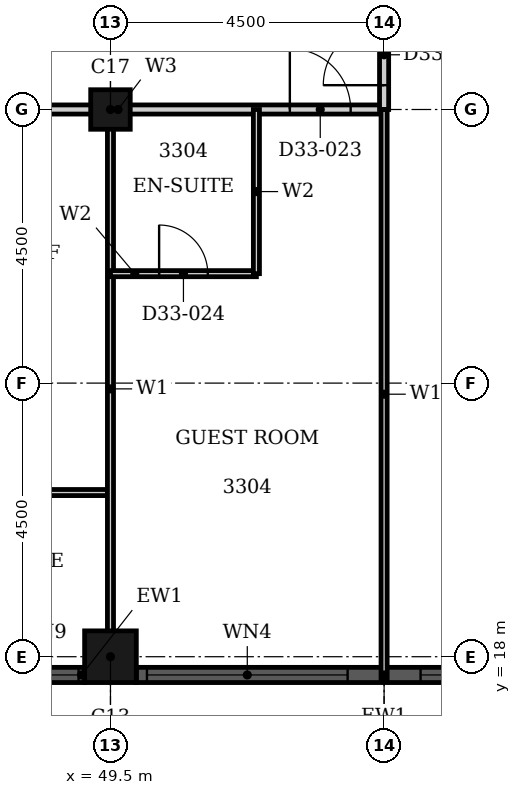
"""IFC4 building model, lengths in metres.
Left out: names, types, materials, properties, quantities, classifications, styles, units other than length and angle.
Written with IfcOpenShell. Run it as: python <this file> out.ifc"""

import sys

from ifc_helpers import new_model, si_unit, direction, frame, frame_2d, origin, origin_2d, place, context, subcontext, project, spatial, rectangle, hollow_rectangle, extrude, element, fill, save


model = new_model("IFC4")
c1 = context("Model", 3, precision=1e-05, world=origin(), true_north=direction((0.0, 1.0)))
c2 = subcontext(c1, "Body", "Model", "MODEL_VIEW")
j1 = project(units=[si_unit("LENGTHUNIT", "METRE"), si_unit("PLANEANGLEUNIT", "RADIAN")], contexts=[c1])
p1 = place(None, origin())
s1 = spatial("IfcSite", under=j1, at=p1, CompositionType="ELEMENT")
p2 = place(p1, origin())
s2 = spatial("IfcBuilding", under=s1, at=p2, CompositionType="ELEMENT")
p3 = place(p2, frame((0.0, 0.0, 133.2)))
s3 = spatial("IfcBuildingStorey", under=s2, at=p3, CompositionType="ELEMENT", Elevation=133.2)
p4 = place(p3, frame((49.5, 18.0, 0.0), z_axis=(0.0, 0.0, 1.0), x_axis=(1.0, 0.0, 0.0)))
e1 = element("IfcColumn", 1, at=p4, inside=s3, PredefinedType="COLUMN", context=c2, shape_type="SweptSolid", body=[
    extrude(hollow_rectangle(XDim=0.85, YDim=0.85, WallThickness=0.026, at=origin_2d()), origin(), (0.0, 0.0, 1.0), 3.6),
])
p5 = place(p3, frame((49.5, 27.0, 0.0), z_axis=(0.0, 0.0, 1.0), x_axis=(1.0, 0.0, 0.0)))
e2 = element("IfcColumn", 2, at=p5, inside=s3, PredefinedType="COLUMN", context=c2, shape_type="SweptSolid", body=[
    extrude(hollow_rectangle(XDim=0.65, YDim=0.65, WallThickness=0.021, at=origin_2d()), origin(), (0.0, 0.0, 1.0), 3.6),
])
p6 = place(p3, frame((47.675, 17.7, 0.0), z_axis=(0.0, 0.0, 1.0), x_axis=(1.0, 0.0, 0.0)))
e3 = element("IfcWall", 3, at=p6, inside=s3, PredefinedType="SOLIDWALL", context=c2, shape_type="SweptSolid", body=[
    extrude(rectangle(XDim=1.4, YDim=0.25, at=frame_2d((0.7, 0.0))), origin(), (0.0, 0.0, 1.0), 3.6),
])
p7 = place(p6, frame((0.1, 0.0, 0.9)))
e4 = element("IfcOpeningElement", 4, at=p7, cuts=e3, PredefinedType="OPENING", context=c2, shape_type="SweptSolid", body=[
    extrude(rectangle(XDim=1.2, YDim=2.08, at=frame_2d((0.6, 1.04))), frame((0.0, 0.135, 0.0), z_axis=(0.0, -1.0, 0.0), x_axis=(1.0, 0.0, 0.0)), (0.0, 0.0, 1.0), 0.27),
])
p8 = place(p3, frame((49.925, 17.7, 0.0), z_axis=(0.0, 0.0, 1.0), x_axis=(1.0, 0.0, 0.0)))
e5 = element("IfcWall", 5, at=p8, inside=s3, PredefinedType="SOLIDWALL", context=c2, shape_type="SweptSolid", body=[
    extrude(rectangle(XDim=8.15, YDim=0.25, at=frame_2d((4.075, 0.0))), origin(), (0.0, 0.0, 1.0), 3.6),
])
p9 = place(p8, frame((0.175, 0.0, 0.9)))
e6 = element("IfcOpeningElement", 6, at=p9, cuts=e5, PredefinedType="OPENING", context=c2, shape_type="SweptSolid", body=[
    extrude(rectangle(XDim=3.3, YDim=2.08, at=frame_2d((1.65, 1.04))), frame((0.0, 0.135, 0.0), z_axis=(0.0, -1.0, 0.0), x_axis=(1.0, 0.0, 0.0)), (0.0, 0.0, 1.0), 0.27),
])
p10 = place(p8, frame((4.675, 0.0, 0.9)))
e7 = element("IfcOpeningElement", 7, at=p10, cuts=e5, PredefinedType="OPENING", context=c2, shape_type="SweptSolid", body=[
    extrude(rectangle(XDim=3.3, YDim=2.08, at=frame_2d((1.65, 1.04))), frame((0.0, 0.135, 0.0), z_axis=(0.0, -1.0, 0.0), x_axis=(1.0, 0.0, 0.0)), (0.0, 0.0, 1.0), 0.27),
])
p11 = place(p3, frame((46.8, 27.0, 0.0), z_axis=(0.0, 0.0, 1.0), x_axis=(1.0, 0.0, 0.0)))
e8 = element("IfcWall", 8, at=p11, inside=s3, PredefinedType="PARTITIONING", context=c2, shape_type="SweptSolid", body=[
    extrude(rectangle(XDim=7.2, YDim=0.15, at=frame_2d((3.6, 0.0))), origin(), (0.0, 0.0, 1.0), 2.58),
])
p12 = place(p11, frame((5.65, 0.0, 0.0)))
e9 = element("IfcOpeningElement", 9, at=p12, cuts=e8, PredefinedType="OPENING", context=c2, shape_type="SweptSolid", body=[
    extrude(rectangle(XDim=1.0, YDim=2.1, at=frame_2d((0.5, 1.05))), frame((0.0, 0.085, 0.0), z_axis=(0.0, -1.0, 0.0), x_axis=(1.0, 0.0, 0.0)), (0.0, 0.0, 1.0), 0.17),
])
p13 = place(p3, frame((54.0, 27.0, 0.0), z_axis=(0.0, 0.0, 1.0), x_axis=(0.0, 1.0, 0.0)))
e10 = element("IfcWall", 10, at=p13, inside=s3, PredefinedType="PARTITIONING", context=c2, shape_type="SweptSolid", body=[
    extrude(rectangle(XDim=1.8, YDim=0.15, at=frame_2d((0.9, 0.0))), origin(), (0.0, 0.0, 1.0), 3.3),
])
p14 = place(p13, frame((0.4, 0.0, 0.0)))
e11 = element("IfcOpeningElement", 11, at=p14, cuts=e10, PredefinedType="OPENING", context=c2, shape_type="SweptSolid", body=[
    extrude(rectangle(XDim=1.0, YDim=2.1, at=frame_2d((0.5, 1.05))), frame((0.0, 0.085, 0.0), z_axis=(0.0, -1.0, 0.0), x_axis=(1.0, 0.0, 0.0)), (0.0, 0.0, 1.0), 0.17),
])
p15 = place(p3, frame((46.8, 20.7, 0.0), z_axis=(0.0, 0.0, 1.0), x_axis=(1.0, 0.0, 0.0)))
e12 = element("IfcWall", 12, at=p15, inside=s3, PredefinedType="PARTITIONING", context=c2, shape_type="SweptSolid", body=[
    extrude(rectangle(XDim=2.7, YDim=0.1, at=frame_2d((1.35, 0.0))), origin(), (0.0, 0.0, 1.0), 3.3),
])
p16 = place(p3, frame((49.5, 17.81, 0.0), z_axis=(0.0, 0.0, 1.0), x_axis=(0.0, 1.0, 0.0)))
e13 = element("IfcWall", 13, at=p16, inside=s3, PredefinedType="PARTITIONING", context=c2, shape_type="SweptSolid", body=[
    extrude(rectangle(XDim=9.19, YDim=0.1, at=frame_2d((4.595, 0.0))), origin(), (0.0, 0.0, 1.0), 2.38),
])
p17 = place(p3, frame((54.0, 17.635, 0.0), z_axis=(0.0, 0.0, 1.0), x_axis=(0.0, 1.0, 0.0)))
e14 = element("IfcWall", 14, at=p17, inside=s3, PredefinedType="PARTITIONING", context=c2, shape_type="SweptSolid", body=[
    extrude(rectangle(XDim=9.365, YDim=0.1, at=frame_2d((4.683, 0.0))), origin(), (0.0, 0.0, 1.0), 3.3),
])
p18 = place(p3, frame((49.5, 24.3, 0.0), z_axis=(0.0, 0.0, 1.0), x_axis=(1.0, 0.0, 0.0)))
e15 = element("IfcWall", 15, at=p18, inside=s3, PredefinedType="PARTITIONING", context=c2, shape_type="SweptSolid", body=[
    extrude(rectangle(XDim=2.4, YDim=0.1, at=frame_2d((1.2, 0.0))), origin(), (0.0, 0.0, 1.0), 3.3),
])
p19 = place(p18, frame((0.8, 0.0, 0.0)))
e16 = element("IfcOpeningElement", 16, at=p19, cuts=e15, PredefinedType="OPENING", context=c2, shape_type="SweptSolid", body=[
    extrude(rectangle(XDim=0.8, YDim=2.1, at=frame_2d((0.4, 1.05))), frame((0.0, 0.06, 0.0), z_axis=(0.0, -1.0, 0.0), x_axis=(1.0, 0.0, 0.0)), (0.0, 0.0, 1.0), 0.12),
])
p20 = place(p3, frame((51.9, 24.3, 0.0), z_axis=(0.0, 0.0, 1.0), x_axis=(0.0, 1.0, 0.0)))
e17 = element("IfcWall", 17, at=p20, inside=s3, PredefinedType="PARTITIONING", context=c2, shape_type="SweptSolid", body=[
    extrude(rectangle(XDim=2.7, YDim=0.1, at=frame_2d((1.35, 0.0))), origin(), (0.0, 0.0, 1.0), 3.3),
])
p21 = place(p7, origin())
e18 = element("IfcWindow", 18, at=p21, inside=s3, PartitioningType="SINGLE_PANEL", PredefinedType="WINDOW", context=c2, shape_type="SweptSolid", body=[
    extrude(rectangle(XDim=1.2, YDim=2.08, at=frame_2d((0.6, 1.04))), frame((0.0, 0.03, 0.0), z_axis=(0.0, -1.0, 0.0), x_axis=(1.0, 0.0, 0.0)), (0.0, 0.0, 1.0), 0.06),
])
fill(e4, e18)
p22 = place(p9, origin())
e19 = element("IfcWindow", 19, at=p22, inside=s3, PartitioningType="SINGLE_PANEL", PredefinedType="WINDOW", context=c2, shape_type="SweptSolid", body=[
    extrude(rectangle(XDim=3.3, YDim=2.08, at=frame_2d((1.65, 1.04))), frame((0.0, 0.03, 0.0), z_axis=(0.0, -1.0, 0.0), x_axis=(1.0, 0.0, 0.0)), (0.0, 0.0, 1.0), 0.06),
])
fill(e6, e19)
p23 = place(p10, origin())
e20 = element("IfcWindow", 20, at=p23, inside=s3, PartitioningType="SINGLE_PANEL", PredefinedType="WINDOW", context=c2, shape_type="SweptSolid", body=[
    extrude(rectangle(XDim=3.3, YDim=2.08, at=frame_2d((1.65, 1.04))), frame((0.0, 0.03, 0.0), z_axis=(0.0, -1.0, 0.0), x_axis=(1.0, 0.0, 0.0)), (0.0, 0.0, 1.0), 0.06),
])
fill(e7, e20)
p24 = place(p12, origin())
e21 = element("IfcDoor", 21, at=p24, inside=s3, OperationType="SINGLE_SWING_RIGHT", PredefinedType="DOOR", context=c2, shape_type="SweptSolid", body=[
    extrude(rectangle(XDim=1.0, YDim=2.1, at=frame_2d((0.5, 1.05))), frame((0.0, 0.025, 0.0), z_axis=(0.0, -1.0, 0.0), x_axis=(1.0, 0.0, 0.0)), (0.0, 0.0, 1.0), 0.05),
])
fill(e9, e21)
p25 = place(p19, origin())
e22 = element("IfcDoor", 22, at=p25, inside=s3, OperationType="SINGLE_SWING_LEFT", PredefinedType="DOOR", context=c2, shape_type="SweptSolid", body=[
    extrude(rectangle(XDim=0.8, YDim=2.1, at=frame_2d((0.4, 1.05))), frame((0.0, 0.025, 0.0), z_axis=(0.0, -1.0, 0.0), x_axis=(1.0, 0.0, 0.0)), (0.0, 0.0, 1.0), 0.05),
])
fill(e16, e22)
p26 = place(p14, origin())
e23 = element("IfcDoor", 23, at=p26, inside=s3, OperationType="SINGLE_SWING_RIGHT", PredefinedType="DOOR", context=c2, shape_type="SweptSolid", body=[
    extrude(rectangle(XDim=1.0, YDim=2.1, at=frame_2d((0.5, 1.05))), frame((0.0, 0.025, 0.0), z_axis=(0.0, -1.0, 0.0), x_axis=(1.0, 0.0, 0.0)), (0.0, 0.0, 1.0), 0.05),
])
fill(e11, e23)
save(model, sys.argv[1])
